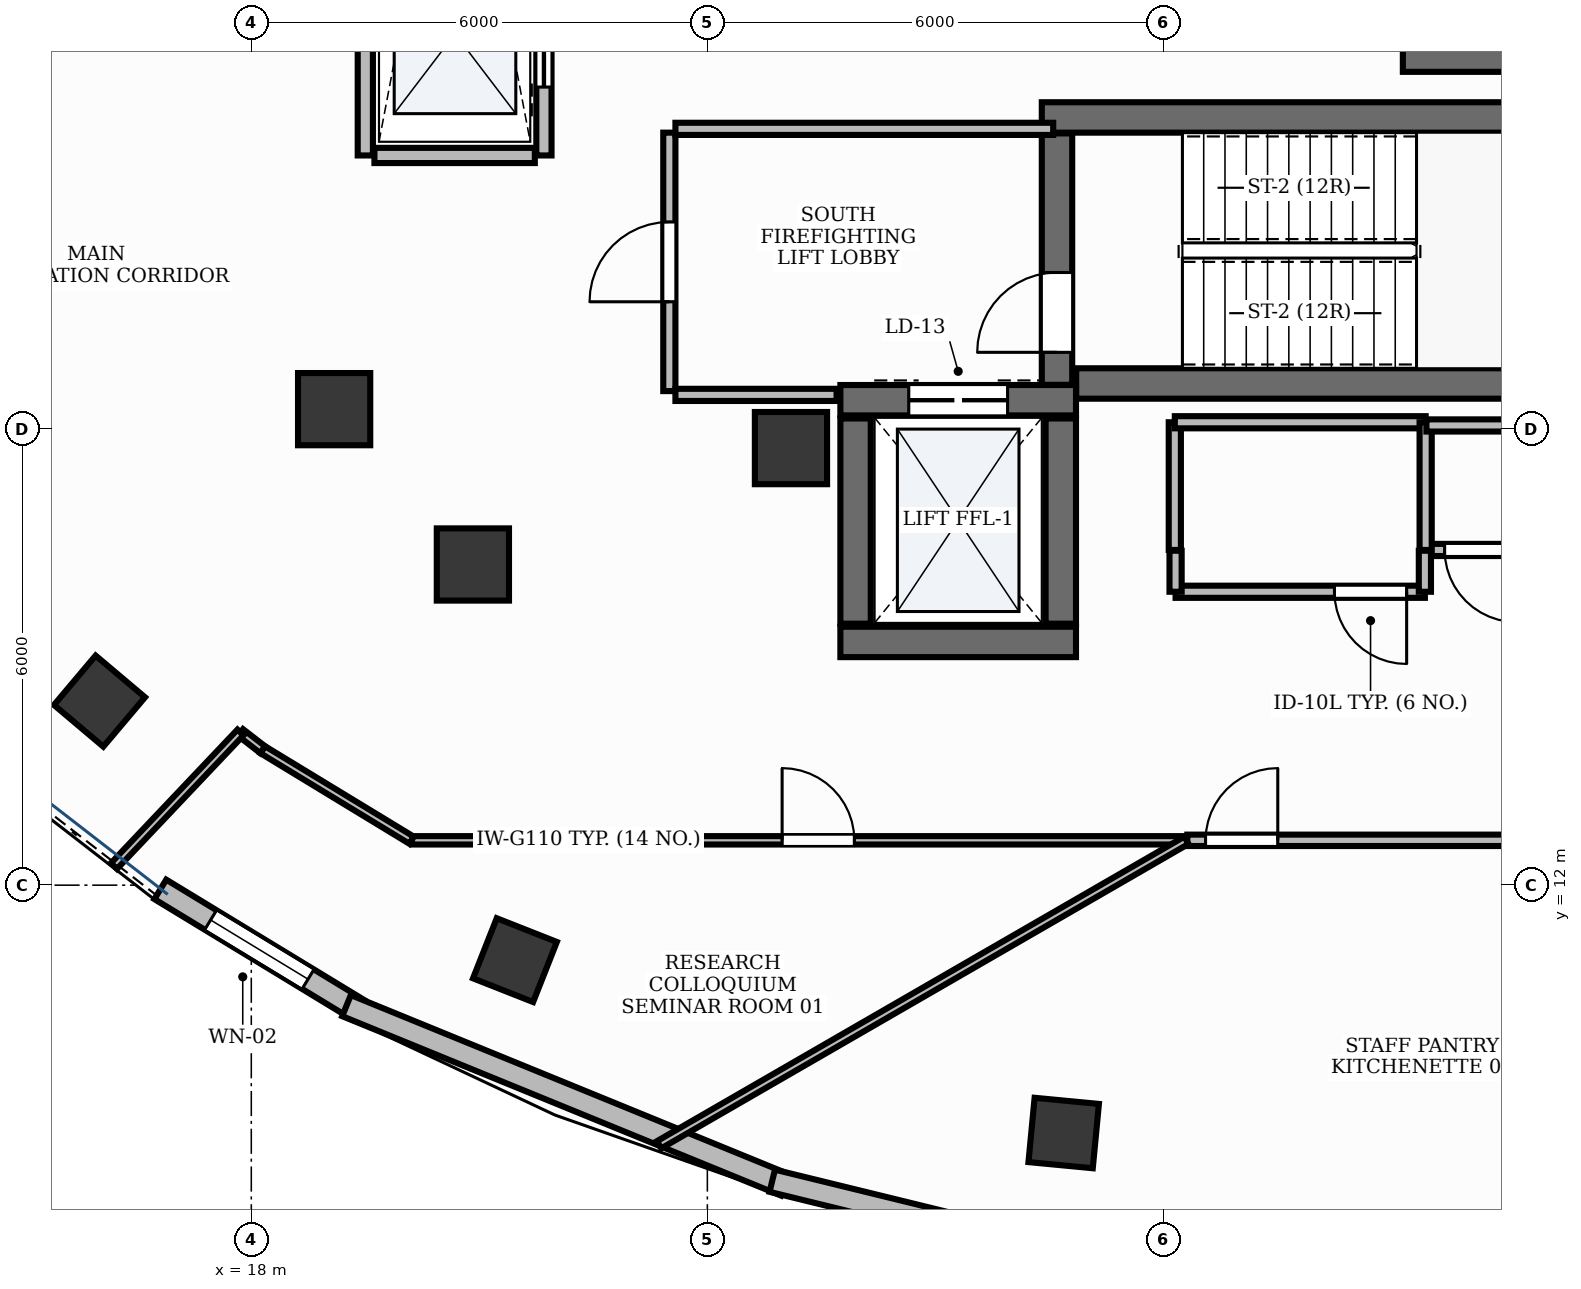
"""IFC4 building model, lengths in metres.
Left out: names, types, materials, properties, quantities, classifications, styles, units other than length and angle.
Written with IfcOpenShell. Run it as: python <this file> out.ifc"""

import sys

from ifc_helpers import new_model, si_unit, direction, frame, frame_2d, origin, origin_2d, place, context, subcontext, project, spatial, rectangle, extrude, element, fill, save


model = new_model("IFC4")
c1 = context("Model", 3, precision=1e-05, world=origin(), true_north=direction((0.0, 1.0)))
c2 = subcontext(c1, "Body", "Model", "MODEL_VIEW")
j1 = project(units=[si_unit("LENGTHUNIT", "METRE"), si_unit("PLANEANGLEUNIT", "RADIAN")], contexts=[c1])
p1 = place(None, origin())
s1 = spatial("IfcSite", under=j1, at=p1, CompositionType="ELEMENT")
p2 = place(p1, origin())
s2 = spatial("IfcBuilding", under=s1, at=p2, CompositionType="ELEMENT")
p3 = place(p2, frame((0.0, 0.0, 268.8)))
s3 = spatial("IfcBuildingStorey", under=s2, at=p3, CompositionType="ELEMENT", Elevation=268.8)
p4 = place(p3, frame((28.852, 18.6, 0.0), z_axis=(0.0, 0.0, 1.0), x_axis=(1.0, 0.0, 0.0)))
e1 = element("IfcWall", 1, at=p4, inside=s3, PredefinedType="SHEAR", context=c2, shape_type="SweptSolid", body=[
    extrude(rectangle(XDim=8.198, YDim=0.4, at=frame_2d((4.099, 0.0))), origin(), (0.0, 0.0, 1.0), 3.9),
])
p5 = place(p3, frame((28.4, 22.1, 0.0), z_axis=(0.0, 0.0, 1.0), x_axis=(1.0, 0.0, 0.0)))
e2 = element("IfcWall", 2, at=p5, inside=s3, PredefinedType="SHEAR", context=c2, shape_type="SweptSolid", body=[
    extrude(rectangle(XDim=8.65, YDim=0.4, at=frame_2d((4.325, 0.0))), origin(), (0.0, 0.0, 1.0), 3.9),
])
p6 = place(p3, frame((28.6, 18.582, 0.0), z_axis=(0.0, 0.0, 1.0), x_axis=(0.0, 1.0, 0.0)))
e3 = element("IfcWall", 3, at=p6, inside=s3, PredefinedType="SHEAR", context=c2, shape_type="SweptSolid", body=[
    extrude(rectangle(XDim=3.308, YDim=0.4, at=frame_2d((1.654, 0.0))), origin(), (0.0, 0.0, 1.0), 3.9),
])
p7 = place(p6, frame((0.428, 0.0, 0.0)))
e4 = element("IfcOpeningElement", 4, at=p7, cuts=e3, PredefinedType="OPENING", context=c2, shape_type="SweptSolid", body=[
    extrude(rectangle(XDim=1.05, YDim=2.15, at=frame_2d((0.525, 1.075))), frame((0.0, 0.215, 0.0), z_axis=(0.0, -1.0, 0.0), x_axis=(1.0, 0.0, 0.0)), (0.0, 0.0, 1.0), 0.43),
])
p8 = place(p3, frame((33.15, 22.9, 0.0), z_axis=(0.0, 0.0, 1.0), x_axis=(1.0, 0.0, 0.0)))
e5 = element("IfcWall", 5, at=p8, inside=s3, PredefinedType="SHEAR", context=c2, shape_type="SweptSolid", body=[
    extrude(rectangle(XDim=3.9, YDim=0.4, at=frame_2d((1.95, 0.0))), origin(), (0.0, 0.0, 1.0), 3.9),
])
p9 = place(p3, frame((25.75, 15.2, 0.0), z_axis=(0.0, 0.0, 1.0), x_axis=(1.0, 0.0, 0.0)))
e6 = element("IfcWall", 6, at=p9, inside=s3, PredefinedType="SHEAR", context=c2, shape_type="SweptSolid", body=[
    extrude(rectangle(XDim=3.1, YDim=0.4, at=frame_2d((1.55, 0.0))), origin(), (0.0, 0.0, 1.0), 3.9),
])
p10 = place(p3, frame((25.75, 18.38, 0.0), z_axis=(0.0, 0.0, 1.0), x_axis=(1.0, 0.0, 0.0)))
e7 = element("IfcWall", 7, at=p10, inside=s3, PredefinedType="SHEAR", context=c2, shape_type="SweptSolid", body=[
    extrude(rectangle(XDim=3.1, YDim=0.4, at=frame_2d((1.55, 0.0))), origin(), (0.0, 0.0, 1.0), 3.9),
])
p11 = place(p10, frame((0.9, 0.0, 0.0)))
e8 = element("IfcOpeningElement", 8, at=p11, cuts=e7, PredefinedType="OPENING", context=c2, shape_type="SweptSolid", body=[
    extrude(rectangle(XDim=1.3, YDim=2.2, at=frame_2d((0.65, 1.1))), frame((0.0, 0.215, 0.0), z_axis=(0.0, -1.0, 0.0), x_axis=(1.0, 0.0, 0.0)), (0.0, 0.0, 1.0), 0.43),
])
for number, where, z_axis, x_axis in (
    (9, (25.95, 15.44, 0.0), (0.0, 0.0, 1.0), (0.0, 1.0, 0.0)),
    (10, (28.65, 15.44, 0.0), (0.0, 0.0, 1.0), (0.0, 1.0, 0.0)),
):
    element("IfcWall", number, at=place(p3, frame(where, z_axis=z_axis, x_axis=x_axis)), inside=s3, PredefinedType="SHEAR", context=c2, shape_type="SweptSolid", body=[
        extrude(rectangle(XDim=2.7, YDim=0.4, at=frame_2d((1.35, 0.0))), origin(), (0.0, 0.0, 1.0), 3.9),
    ])
p12 = place(p3, frame((25.1, 17.75, -0.0), z_axis=(0.0, 0.0, 1.0), x_axis=(1.0, 0.0, 0.0)))
e11 = element("IfcColumn", 11, at=p12, inside=s3, PredefinedType="PILASTER", context=c2, shape_type="SweptSolid", body=[
    extrude(rectangle(XDim=0.95, YDim=0.95, at=origin_2d()), origin(), (0.0, 0.0, 1.0), 3.901),
])
p13 = place(p3, frame((19.09, 18.262, -0.0), z_axis=(0.0, 0.0, 1.0), x_axis=(1.0, 0.0, 0.0)))
e12 = element("IfcColumn", 12, at=p13, inside=s3, PredefinedType="COLUMN", context=c2, shape_type="SweptSolid", body=[
    extrude(rectangle(XDim=0.95, YDim=0.95, at=origin_2d()), origin(), (0.0, 0.0, 1.0), 3.901),
])
p14 = place(p3, frame((16.003, 14.421, -0.0), z_axis=(0.0, 0.0, 1.0), x_axis=(-0.764246456939, 0.644924300253, 0.0)))
e13 = element("IfcColumn", 13, at=p14, inside=s3, PredefinedType="COLUMN", context=c2, shape_type="SweptSolid", body=[
    extrude(rectangle(XDim=0.85, YDim=0.85, at=origin_2d()), origin(), (0.0, 0.0, 1.0), 3.901),
])
p15 = place(p3, frame((20.915, 16.219, -0.0), z_axis=(0.0, 0.0, 1.0), x_axis=(1.0, 0.0, 0.0)))
e14 = element("IfcColumn", 14, at=p15, inside=s3, PredefinedType="COLUMN", context=c2, shape_type="SweptSolid", body=[
    extrude(rectangle(XDim=0.95, YDim=0.95, at=origin_2d()), origin(), (0.0, 0.0, 1.0), 3.901),
])
for number, where, z_axis, x_axis in (
    (15, (21.469, 11.014, -0.0), (0.0, 0.0, 1.0), (-0.93, 0.367, 0.0)),
    (16, (28.688, 8.739, -0.0), (0.0, 0.0, 1.0), (-0.995, 0.095, 0.0)),
):
    element("IfcColumn", number, at=place(p3, frame(where, z_axis=z_axis, x_axis=x_axis)), inside=s3, PredefinedType="COLUMN", context=c2, shape_type="SweptSolid", body=[
        extrude(rectangle(XDim=0.85, YDim=0.85, at=origin_2d()), origin(), (0.0, 0.0, 1.0), 3.901),
    ])
p16 = place(p3, frame((16.803, 11.945, 0.0), z_axis=(0.0, 0.0, 1.0), x_axis=(0.854482916714, -0.519479494344, 0.0)))
e17 = element("IfcWall", 17, at=p16, inside=s3, PredefinedType="STANDARD", context=c2, shape_type="SweptSolid", body=[
    extrude(rectangle(XDim=3.049, YDim=0.3, at=frame_2d((1.524, 0.0))), origin(), (0.0, 0.0, 1.0), 3.9),
])
p17 = place(p16, frame((0.774, 0.0, 0.95)))
e18 = element("IfcOpeningElement", 18, at=p17, cuts=e17, PredefinedType="OPENING", context=c2, shape_type="SweptSolid", body=[
    extrude(rectangle(XDim=1.5, YDim=1.8, at=frame_2d((0.75, 0.9))), frame((0.0, 0.165, 0.0), z_axis=(0.0, -1.0, 0.0), x_axis=(1.0, 0.0, 0.0)), (0.0, 0.0, 1.0), 0.33),
])
p18 = place(p3, frame((19.253, 10.415, 0.0), z_axis=(0.0, 0.0, 1.0), x_axis=(0.925644837168, -0.378393492841, 0.0)))
e19 = element("IfcWall", 19, at=p18, inside=s3, PredefinedType="STANDARD", context=c2, shape_type="SweptSolid", body=[
    extrude(rectangle(XDim=6.236, YDim=0.3, at=frame_2d((3.118, 0.0))), origin(), (0.0, 0.0, 1.0), 3.47),
])
p19 = place(p3, frame((24.854, 8.111, 0.0), z_axis=(0.0, 0.0, 1.0), x_axis=(0.971305358754, -0.23783586789, 0.0)))
e20 = element("IfcWall", 20, at=p19, inside=s3, PredefinedType="STANDARD", context=c2, shape_type="SweptSolid", body=[
    extrude(rectangle(XDim=3.29, YDim=0.3, at=frame_2d((1.645, 0.0))), origin(), (0.0, 0.0, 1.0), 3.9),
])
p20 = place(p3, frame((19.5, 21.6, 0.0), z_axis=(0.0, 0.0, 1.0), x_axis=(0.0, 1.0, 0.0)))
e21 = element("IfcWall", 21, at=p20, inside=s3, PredefinedType="PARTITIONING", context=c2, shape_type="SweptSolid", body=[
    extrude(rectangle(XDim=10.8, YDim=0.2, at=frame_2d((5.4, 0.0))), origin(), (0.0, 0.0, 1.0), 2.91),
])
p21 = place(p3, frame((21.85, 21.6, 0.0), z_axis=(0.0, 0.0, 1.0), x_axis=(0.0, 1.0, 0.0)))
e22 = element("IfcWall", 22, at=p21, inside=s3, PredefinedType="PARTITIONING", context=c2, shape_type="SweptSolid", body=[
    extrude(rectangle(XDim=10.8, YDim=0.2, at=frame_2d((5.4, 0.0))), origin(), (0.0, 0.0, 1.0), 2.91),
])
p22 = place(p21, frame((0.9, 0.0, 0.0)))
e23 = element("IfcOpeningElement", 23, at=p22, cuts=e22, PredefinedType="OPENING", context=c2, shape_type="SweptSolid", body=[
    extrude(rectangle(XDim=1.1, YDim=2.2, at=frame_2d((0.55, 1.1))), frame((0.0, 0.115, 0.0), z_axis=(0.0, -1.0, 0.0), x_axis=(1.0, 0.0, 0.0)), (0.0, 0.0, 1.0), 0.23),
])
p23 = place(p21, frame((3.6, 0.0, 0.0)))
e24 = element("IfcOpeningElement", 24, at=p23, cuts=e22, PredefinedType="OPENING", context=c2, shape_type="SweptSolid", body=[
    extrude(rectangle(XDim=1.1, YDim=2.2, at=frame_2d((0.55, 1.1))), frame((0.0, 0.115, 0.0), z_axis=(0.0, -1.0, 0.0), x_axis=(1.0, 0.0, 0.0)), (0.0, 0.0, 1.0), 0.23),
])
p24 = place(p21, frame((6.3, 0.0, 0.0)))
e25 = element("IfcOpeningElement", 25, at=p24, cuts=e22, PredefinedType="OPENING", context=c2, shape_type="SweptSolid", body=[
    extrude(rectangle(XDim=1.1, YDim=2.2, at=frame_2d((0.55, 1.1))), frame((0.0, 0.115, 0.0), z_axis=(0.0, -1.0, 0.0), x_axis=(1.0, 0.0, 0.0)), (0.0, 0.0, 1.0), 0.23),
])
p25 = place(p21, frame((9.0, 0.0, 0.0)))
e26 = element("IfcOpeningElement", 26, at=p25, cuts=e22, PredefinedType="OPENING", context=c2, shape_type="SweptSolid", body=[
    extrude(rectangle(XDim=1.1, YDim=2.2, at=frame_2d((0.55, 1.1))), frame((0.0, 0.115, 0.0), z_axis=(0.0, -1.0, 0.0), x_axis=(1.0, 0.0, 0.0)), (0.0, 0.0, 1.0), 0.23),
])
p26 = place(p3, frame((19.62, 21.6, 0.0), z_axis=(0.0, 0.0, 1.0), x_axis=(1.0, 0.0, 0.0)))
e27 = element("IfcWall", 27, at=p26, inside=s3, PredefinedType="PARTITIONING", context=c2, shape_type="SweptSolid", body=[
    extrude(rectangle(XDim=2.11, YDim=0.2, at=frame_2d((1.055, 0.0))), origin(), (0.0, 0.0, 1.0), 2.91),
])
p27 = place(p3, frame((23.5, 18.5, 0.0), z_axis=(0.0, 0.0, 1.0), x_axis=(0.0, 1.0, 0.0)))
e28 = element("IfcWall", 28, at=p27, inside=s3, PredefinedType="PARTITIONING", context=c2, shape_type="SweptSolid", body=[
    extrude(rectangle(XDim=3.4, YDim=0.16, at=frame_2d((1.7, 0.0))), origin(), (0.0, 0.0, 1.0), 2.91),
])
p28 = place(p27, frame((1.175, 0.0, 0.0)))
e29 = element("IfcOpeningElement", 29, at=p28, cuts=e28, PredefinedType="OPENING", context=c2, shape_type="SweptSolid", body=[
    extrude(rectangle(XDim=1.05, YDim=2.15, at=frame_2d((0.525, 1.075))), frame((0.0, 0.095, 0.0), z_axis=(0.0, -1.0, 0.0), x_axis=(1.0, 0.0, 0.0)), (0.0, 0.0, 1.0), 0.19),
])
p29 = place(p3, frame((23.58, 21.95, 0.0), z_axis=(0.0, 0.0, 1.0), x_axis=(1.0, 0.0, 0.0)))
e30 = element("IfcWall", 30, at=p29, inside=s3, PredefinedType="PARTITIONING", context=c2, shape_type="SweptSolid", body=[
    extrude(rectangle(XDim=4.97, YDim=0.16, at=frame_2d((2.485, 0.0))), origin(), (0.0, 0.0, 1.0), 2.91),
])
p30 = place(p3, frame((23.58, 18.45, 0.0), z_axis=(0.0, 0.0, 1.0), x_axis=(1.0, 0.0, 0.0)))
e31 = element("IfcWall", 31, at=p30, inside=s3, PredefinedType="PARTITIONING", context=c2, shape_type="SweptSolid", body=[
    extrude(rectangle(XDim=2.12, YDim=0.16, at=frame_2d((1.06, 0.0))), origin(), (0.0, 0.0, 1.0), 2.91),
])
p31 = place(p3, frame((33.44, 15.86, 0.0), z_axis=(0.0, 0.0, 1.0), x_axis=(-1.0, 0.0, 0.0)))
e32 = element("IfcWall", 32, at=p31, inside=s3, PredefinedType="PARTITIONING", context=c2, shape_type="SweptSolid", body=[
    extrude(rectangle(XDim=3.28, YDim=0.16, at=frame_2d((1.64, 0.0))), origin(), (0.0, 0.0, 1.0), 2.91),
])
p32 = place(p31, frame((0.24, 0.0, 0.0)))
e33 = element("IfcOpeningElement", 33, at=p32, cuts=e32, PredefinedType="OPENING", context=c2, shape_type="SweptSolid", body=[
    extrude(rectangle(XDim=0.95, YDim=2.15, at=frame_2d((0.475, 1.075))), frame((0.0, 0.095, 0.0), z_axis=(0.0, -1.0, 0.0), x_axis=(1.0, 0.0, 0.0)), (0.0, 0.0, 1.0), 0.19),
])
p33 = place(p3, frame((20.114, 12.59, 0.0), z_axis=(0.0, 0.0, 1.0), x_axis=(1.0, 0.0, 0.0)))
e34 = element("IfcWall", 34, at=p33, inside=s3, PredefinedType="MOVABLE", context=c2, shape_type="SweptSolid", body=[
    extrude(rectangle(XDim=10.188, YDim=0.11, at=frame_2d((5.094, 0.0))), origin(), (0.0, 0.0, 1.0), 2.91),
])
p34 = place(p33, frame((4.87, 0.0, 0.0)))
e35 = element("IfcOpeningElement", 35, at=p34, cuts=e34, PredefinedType="OPENING", context=c2, shape_type="SweptSolid", body=[
    extrude(rectangle(XDim=0.95, YDim=2.15, at=frame_2d((0.475, 1.075))), frame((0.0, 0.07, 0.0), z_axis=(0.0, -1.0, 0.0), x_axis=(1.0, 0.0, 0.0)), (0.0, 0.0, 1.0), 0.14),
])
p35 = place(p3, frame((30.314, 12.59, 0.0), z_axis=(0.0, 0.0, 1.0), x_axis=(1.0, 0.0, 0.0)))
e36 = element("IfcWall", 36, at=p35, inside=s3, PredefinedType="PARTITIONING", context=c2, shape_type="SweptSolid", body=[
    extrude(rectangle(XDim=12.884, YDim=0.15, at=frame_2d((6.442, 0.0))), origin(), (0.0, 0.0, 1.0), 2.91),
])
p36 = place(p35, frame((0.24, 0.0, 0.0)))
e37 = element("IfcOpeningElement", 37, at=p36, cuts=e36, PredefinedType="OPENING", context=c2, shape_type="SweptSolid", body=[
    extrude(rectangle(XDim=0.95, YDim=2.15, at=frame_2d((0.475, 1.075))), frame((0.0, 0.09, 0.0), z_axis=(0.0, -1.0, 0.0), x_axis=(1.0, 0.0, 0.0)), (0.0, 0.0, 1.0), 0.18),
])
p37 = place(p3, frame((41.808, 16.41, 0.0), z_axis=(0.0, 0.0, 1.0), x_axis=(-1.0, 0.0, 0.0)))
e38 = element("IfcWall", 38, at=p37, inside=s3, PredefinedType="PARTITIONING", context=c2, shape_type="SweptSolid", body=[
    extrude(rectangle(XDim=8.348, YDim=0.16, at=frame_2d((4.174, 0.0))), origin(), (0.0, 0.0, 1.0), 2.91),
])
p38 = place(p37, frame((7.158, 0.0, 0.0)))
e39 = element("IfcOpeningElement", 39, at=p38, cuts=e38, PredefinedType="OPENING", context=c2, shape_type="SweptSolid", body=[
    extrude(rectangle(XDim=0.95, YDim=2.15, at=frame_2d((0.475, 1.075))), frame((0.0, 0.095, 0.0), z_axis=(0.0, -1.0, 0.0), x_axis=(1.0, 0.0, 0.0)), (0.0, 0.0, 1.0), 0.19),
])
for number, where, z_axis, x_axis in (
    (40, (33.44, 16.4, 0.0), (0.0, 0.0, 1.0), (0.0, -1.0, 0.0)),
    (41, (30.16, 15.86, 0.0), (0.0, 0.0, 1.0), (0.0, 1.0, 0.0)),
):
    element("IfcWall", number, at=place(p3, frame(where, z_axis=z_axis, x_axis=x_axis)), inside=s3, PredefinedType="PARTITIONING", context=c2, shape_type="SweptSolid", body=[
        extrude(rectangle(XDim=0.54, YDim=0.16, at=frame_2d((0.27, 0.0))), origin(), (0.0, 0.0, 1.0), 2.91),
    ])
p39 = place(p3, frame((30.15, 16.41, 0.0), z_axis=(0.0, 0.0, 1.0), x_axis=(0.0, 1.0, 0.0)))
e42 = element("IfcWall", 42, at=p39, inside=s3, PredefinedType="PARTITIONING", context=c2, shape_type="SweptSolid", body=[
    extrude(rectangle(XDim=1.68, YDim=0.16, at=frame_2d((0.84, 0.0))), origin(), (0.0, 0.0, 1.0), 2.91),
])
p40 = place(p3, frame((30.15, 18.09, 0.0), z_axis=(0.0, 0.0, 1.0), x_axis=(1.0, 0.0, 0.0)))
e43 = element("IfcWall", 43, at=p40, inside=s3, PredefinedType="PARTITIONING", context=c2, shape_type="SweptSolid", body=[
    extrude(rectangle(XDim=3.3, YDim=0.16, at=frame_2d((1.65, 0.0))), origin(), (0.0, 0.0, 1.0), 2.91),
])
p41 = place(p3, frame((33.45, 18.09, 0.0), z_axis=(0.0, 0.0, 1.0), x_axis=(0.0, -1.0, 0.0)))
e44 = element("IfcWall", 44, at=p41, inside=s3, PredefinedType="PARTITIONING", context=c2, shape_type="SweptSolid", body=[
    extrude(rectangle(XDim=1.68, YDim=0.16, at=frame_2d((0.84, 0.0))), origin(), (0.0, 0.0, 1.0), 2.91),
])
p42 = place(p3, frame((17.858, 14.009, 0.0), z_axis=(0.0, 0.0, 1.0), x_axis=(0.790486870827, -0.612478984986, 0.0)))
e45 = element("IfcWall", 45, at=p42, inside=s3, PredefinedType="MOVABLE", context=c2, shape_type="SweptSolid", body=[
    extrude(rectangle(XDim=0.37, YDim=0.11, at=frame_2d((0.185, 0.0))), origin(), (0.0, 0.0, 1.0), 2.91),
])
p43 = place(p3, frame((18.151, 13.781, 0.0), z_axis=(0.0, 0.0, 1.0), x_axis=(0.854507101003, -0.519439711935, 0.0)))
e46 = element("IfcWall", 46, at=p43, inside=s3, PredefinedType="MOVABLE", context=c2, shape_type="SweptSolid", body=[
    extrude(rectangle(XDim=2.291, YDim=0.11, at=frame_2d((1.146, 0.0))), origin(), (0.0, 0.0, 1.0), 2.91),
])
p44 = place(p3, frame((30.302, 12.59, 0.0), z_axis=(0.0, 0.0, 1.0), x_axis=(-0.866017589642, -0.500013534248, 0.0)))
e47 = element("IfcWall", 47, at=p44, inside=s3, PredefinedType="MOVABLE", context=c2, shape_type="SweptSolid", body=[
    extrude(rectangle(XDim=8.01, YDim=0.11, at=frame_2d((4.005, 0.0))), origin(), (0.0, 0.0, 1.0), 2.91),
])
p45 = place(p3, frame((16.193, 12.251, 0.0), z_axis=(0.0, 0.0, 1.0), x_axis=(0.687683096997, 0.726010990347, 0.0)))
e48 = element("IfcWall", 48, at=p45, inside=s3, PredefinedType="MOVABLE", context=c2, shape_type="SweptSolid", body=[
    extrude(rectangle(XDim=2.42, YDim=0.11, at=frame_2d((1.21, 0.0))), origin(), (0.0, 0.0, 1.0), 2.91),
])
p46 = place(p3, frame((33.46, 18.048, 0.0), z_axis=(0.0, 0.0, 1.0), x_axis=(1.0, 0.0, 0.0)))
e49 = element("IfcWall", 49, at=p46, inside=s3, PredefinedType="PARTITIONING", context=c2, shape_type="SweptSolid", body=[
    extrude(rectangle(XDim=1.501, YDim=0.16, at=frame_2d((0.75, 0.0))), origin(), (0.0, 0.0, 1.0), 2.91),
])
p47 = place(p17, origin())
e50 = element("IfcWindow", 50, at=p47, inside=s3, PartitioningType="DOUBLE_PANEL_VERTICAL", PredefinedType="WINDOW", context=c2, shape_type="SweptSolid", body=[
    extrude(rectangle(XDim=1.5, YDim=1.8, at=frame_2d((0.75, 0.9))), frame((0.0, 0.03, 0.0), z_axis=(0.0, -1.0, 0.0), x_axis=(1.0, 0.0, 0.0)), (0.0, 0.0, 1.0), 0.06),
])
fill(e18, e50)
p48 = place(p7, origin())
e51 = element("IfcDoor", 51, at=p48, inside=s3, OperationType="SINGLE_SWING_LEFT", PredefinedType="DOOR", context=c2, shape_type="SweptSolid", body=[
    extrude(rectangle(XDim=1.05, YDim=2.15, at=frame_2d((0.525, 1.075))), frame((0.0, 0.025, 0.0), z_axis=(0.0, -1.0, 0.0), x_axis=(1.0, 0.0, 0.0)), (0.0, 0.0, 1.0), 0.05),
])
fill(e4, e51)
p49 = place(p22, origin())
e52 = element("IfcDoor", 52, at=p49, inside=s3, OperationType="DOUBLE_DOOR_SLIDING", PredefinedType="DOOR", context=c2, shape_type="SweptSolid", body=[
    extrude(rectangle(XDim=1.1, YDim=2.2, at=frame_2d((0.55, 1.1))), frame((0.0, 0.025, 0.0), z_axis=(0.0, -1.0, 0.0), x_axis=(1.0, 0.0, 0.0)), (0.0, 0.0, 1.0), 0.05),
])
fill(e23, e52)
p50 = place(p11, origin())
e53 = element("IfcDoor", 53, at=p50, inside=s3, OperationType="DOUBLE_DOOR_SLIDING", PredefinedType="DOOR", context=c2, shape_type="SweptSolid", body=[
    extrude(rectangle(XDim=1.3, YDim=2.2, at=frame_2d((0.65, 1.1))), frame((0.0, 0.025, 0.0), z_axis=(0.0, -1.0, 0.0), x_axis=(1.0, 0.0, 0.0)), (0.0, 0.0, 1.0), 0.05),
])
fill(e8, e53)
p51 = place(p28, origin())
e54 = element("IfcDoor", 54, at=p51, inside=s3, OperationType="SINGLE_SWING_LEFT", PredefinedType="DOOR", context=c2, shape_type="SweptSolid", body=[
    extrude(rectangle(XDim=1.05, YDim=2.15, at=frame_2d((0.525, 1.075))), frame((0.0, 0.025, 0.0), z_axis=(0.0, -1.0, 0.0), x_axis=(1.0, 0.0, 0.0)), (0.0, 0.0, 1.0), 0.05),
])
fill(e29, e54)
p52 = place(p32, origin())
e55 = element("IfcDoor", 55, at=p52, inside=s3, OperationType="SINGLE_SWING_LEFT", PredefinedType="DOOR", context=c2, shape_type="SweptSolid", body=[
    extrude(rectangle(XDim=0.95, YDim=2.15, at=frame_2d((0.475, 1.075))), frame((0.0, 0.025, 0.0), z_axis=(0.0, -1.0, 0.0), x_axis=(1.0, 0.0, 0.0)), (0.0, 0.0, 1.0), 0.05),
])
fill(e33, e55)
p53 = place(p34, origin())
e56 = element("IfcDoor", 56, at=p53, inside=s3, OperationType="SINGLE_SWING_LEFT", PredefinedType="DOOR", context=c2, shape_type="SweptSolid", body=[
    extrude(rectangle(XDim=0.95, YDim=2.15, at=frame_2d((0.475, 1.075))), frame((0.0, 0.025, 0.0), z_axis=(0.0, -1.0, 0.0), x_axis=(1.0, 0.0, 0.0)), (0.0, 0.0, 1.0), 0.05),
])
fill(e35, e56)
p54 = place(p36, origin())
e57 = element("IfcDoor", 57, at=p54, inside=s3, OperationType="SINGLE_SWING_RIGHT", PredefinedType="DOOR", context=c2, shape_type="SweptSolid", body=[
    extrude(rectangle(XDim=0.95, YDim=2.15, at=frame_2d((0.475, 1.075))), frame((0.0, 0.025, 0.0), z_axis=(0.0, -1.0, 0.0), x_axis=(1.0, 0.0, 0.0)), (0.0, 0.0, 1.0), 0.05),
])
fill(e37, e57)
p55 = place(p38, origin())
e58 = element("IfcDoor", 58, at=p55, inside=s3, OperationType="SINGLE_SWING_LEFT", PredefinedType="DOOR", context=c2, shape_type="SweptSolid", body=[
    extrude(rectangle(XDim=0.95, YDim=2.15, at=frame_2d((0.475, 1.075))), frame((0.0, 0.025, 0.0), z_axis=(0.0, -1.0, 0.0), x_axis=(1.0, 0.0, 0.0)), (0.0, 0.0, 1.0), 0.05),
])
fill(e39, e58)
save(model, sys.argv[1])
